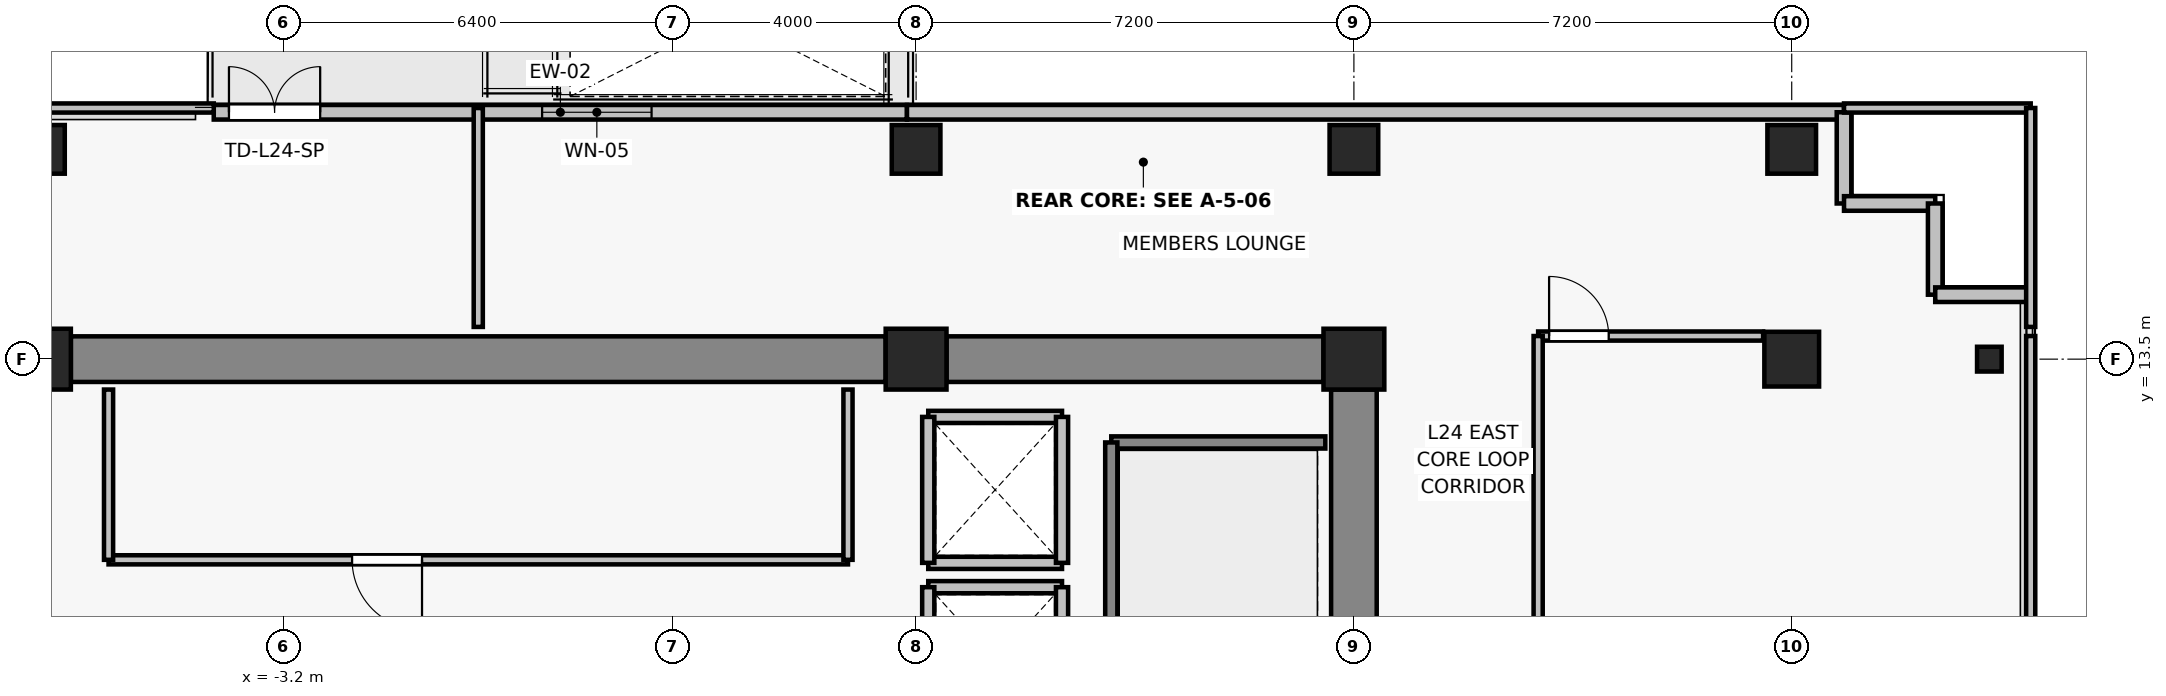
"""IFC4 building model, lengths in metres.
Left out: names, types, materials, properties, quantities, classifications, styles, units other than length and angle.
Written with IfcOpenShell. Run it as: python <this file> out.ifc"""

import sys

from ifc_helpers import new_model, si_unit, direction, frame, frame_2d, origin, origin_2d, place, context, subcontext, project, spatial, rectangle, i_section, extrude, source, transform, mapped, element, fill, save


model = new_model("IFC4")
c1 = context("Model", 3, precision=1e-05, world=origin(), true_north=direction((0.0, 1.0)))
c2 = subcontext(c1, "Body", "Model", "MODEL_VIEW")
j1 = project(units=[si_unit("LENGTHUNIT", "METRE"), si_unit("PLANEANGLEUNIT", "RADIAN")], contexts=[c1])
p1 = place(None, origin())
s1 = spatial("IfcSite", under=j1, at=p1, CompositionType="ELEMENT")
p2 = place(p1, origin())
s2 = spatial("IfcBuilding", under=s1, at=p2, CompositionType="ELEMENT")
p3 = place(p2, frame((0.0, 0.0, 90.1)))
s3 = spatial("IfcBuildingStorey", under=s2, at=p3, CompositionType="ELEMENT", Elevation=90.1)
for number, where, z_axis, x_axis in (
    (1, (-7.2, 13.5, 0.0), (0.0, 0.0, 1.0), (1.0, 0.0, 0.0)),
    (2, (7.2, 13.5, 0.0), (0.0, 0.0, 1.0), (1.0, 0.0, 0.0)),
    (3, (14.4, 13.5, 0.0), (0.0, 0.0, 1.0), (1.0, 0.0, 0.0)),
):
    element("IfcColumn", number, at=place(p3, frame(where, z_axis=z_axis, x_axis=x_axis)), inside=s3, PredefinedType="COLUMN", context=c2, shape_type="SweptSolid", body=[
        extrude(rectangle(XDim=1.0, YDim=1.0, at=origin_2d()), origin(), (0.0, 0.0, 1.0), 3.3),
    ])
p4 = place(p3, frame((21.6, 13.5, 0.0), z_axis=(0.0, 0.0, 1.0), x_axis=(1.0, 0.0, 0.0)))
e4 = element("IfcColumn", 4, at=p4, inside=s3, PredefinedType="COLUMN", context=c2, shape_type="SweptSolid", body=[
    extrude(rectangle(XDim=0.9, YDim=0.9, at=origin_2d()), origin(), (0.0, 0.0, 1.0), 3.3),
])
for number, where, z_axis, x_axis in (
    (5, (-7.2, 16.95, 0.0), (0.0, 0.0, 1.0), (1.0, 0.0, 0.0)),
    (6, (7.2, 16.95, 0.0), (0.0, 0.0, 1.0), (1.0, 0.0, 0.0)),
    (7, (14.4, 16.95, 0.0), (0.0, 0.0, 1.0), (1.0, 0.0, 0.0)),
    (8, (21.6, 16.95, 0.0), (0.0, 0.0, 1.0), (1.0, 0.0, 0.0)),
):
    element("IfcColumn", number, at=place(p3, frame(where, z_axis=z_axis, x_axis=x_axis)), inside=s3, PredefinedType="COLUMN", context=c2, shape_type="SweptSolid", body=[
        extrude(rectangle(XDim=0.8, YDim=0.8, at=origin_2d()), origin(), (0.0, 0.0, 1.0), 3.3),
    ])
p5 = place(p3, frame((24.85, 13.5, 0.0), z_axis=(0.0, 0.0, 1.0), x_axis=(1.0, 0.0, 0.0)))
e9 = element("IfcColumn", 9, at=p5, inside=s3, PredefinedType="COLUMN", context=c2, shape_type="SweptSolid", body=[
    extrude(i_section(OverallWidth=0.404, OverallDepth=0.407, WebThickness=0.022, FlangeThickness=0.032, FilletRadius=0.015, at=origin_2d()), origin(), (0.0, 0.0, 1.0), 3.3),
])
p6 = place(p3, frame((-6.7, 13.5, 0.0), z_axis=(0.0, 0.0, 1.0), x_axis=(1.0, 0.0, 0.0)))
e10 = element("IfcWall", 10, at=p6, inside=s3, PredefinedType="SHEAR", context=c2, shape_type="SweptSolid", body=[
    extrude(rectangle(XDim=13.4, YDim=0.75, at=frame_2d((6.7, 0.0))), origin(), (0.0, 0.0, 1.0), 3.075),
])
p7 = place(p3, frame((7.7, 13.5, 0.0), z_axis=(0.0, 0.0, 1.0), x_axis=(1.0, 0.0, 0.0)))
e11 = element("IfcWall", 11, at=p7, inside=s3, PredefinedType="SHEAR", context=c2, shape_type="SweptSolid", body=[
    extrude(rectangle(XDim=6.2, YDim=0.75, at=frame_2d((3.1, 0.0))), origin(), (0.0, 0.0, 1.0), 3.075),
])
p8 = place(p3, frame((14.4, 7.1, 0.0), z_axis=(0.0, 0.0, 1.0), x_axis=(0.0, 1.0, 0.0)))
e12 = element("IfcWall", 12, at=p8, inside=s3, PredefinedType="SHEAR", context=c2, shape_type="SweptSolid", body=[
    extrude(rectangle(XDim=5.9, YDim=0.75, at=frame_2d((2.95, 0.0))), origin(), (0.0, 0.0, 1.0), 3.075),
])
p9 = place(p3, frame((-4.35, 17.56, 0.0), z_axis=(0.0, 0.0, 1.0), x_axis=(1.0, 0.0, 0.0)))
e13 = element("IfcWall", 13, at=p9, inside=s3, PredefinedType="SOLIDWALL", context=c2, shape_type="SweptSolid", body=[
    extrude(rectangle(XDim=11.4, YDim=0.24, at=frame_2d((5.7, 0.0))), origin(), (0.0, 0.0, 1.0), 3.075),
])
p10 = place(p9, frame((0.25, 0.0, 0.0)))
e14 = element("IfcOpeningElement", 14, at=p10, cuts=e13, PredefinedType="OPENING", context=c2, shape_type="SweptSolid", body=[
    extrude(rectangle(XDim=1.5, YDim=2.2, at=frame_2d((0.75, 1.1))), frame((0.0, 0.13, 0.0), z_axis=(0.0, -1.0, 0.0), x_axis=(1.0, 0.0, 0.0)), (0.0, 0.0, 1.0), 0.26),
])
p11 = place(p9, frame((5.4, 0.0, 0.85)))
e15 = element("IfcOpeningElement", 15, at=p11, cuts=e13, PredefinedType="OPENING", context=c2, shape_type="SweptSolid", body=[
    extrude(rectangle(XDim=1.8, YDim=1.6, at=frame_2d((0.9, 0.8))), frame((0.0, 0.13, 0.0), z_axis=(0.0, -1.0, 0.0), x_axis=(1.0, 0.0, 0.0)), (0.0, 0.0, 1.0), 0.26),
])
p12 = place(p3, frame((22.46, 17.56, 0.0), z_axis=(0.0, 0.0, 1.0), x_axis=(-1.0, 0.0, 0.0)))
e16 = element("IfcWall", 16, at=p12, inside=s3, PredefinedType="SOLIDWALL", context=c2, shape_type="SweptSolid", body=[
    extrude(rectangle(XDim=15.41, YDim=0.24, at=frame_2d((7.705, 0.0))), origin(), (0.0, 0.0, 1.0), 3.075),
])
p13 = place(p3, frame((22.46, 16.06, 0.0), z_axis=(0.0, 0.0, 1.0), x_axis=(0.0, 1.0, 0.0)))
e17 = element("IfcWall", 17, at=p13, inside=s3, PredefinedType="SOLIDWALL", context=c2, shape_type="SweptSolid", body=[
    extrude(rectangle(XDim=1.5, YDim=0.24, at=frame_2d((0.75, 0.0))), origin(), (0.0, 0.0, 1.0), 2.565),
])
for number, where, z_axis, x_axis in (
    (18, (23.96, 16.06, 0.0), (0.0, 0.0, 1.0), (-1.0, 0.0, 0.0)),
    (19, (23.96, 14.56, 0.0), (0.0, 0.0, 1.0), (0.0, 1.0, 0.0)),
    (20, (25.46, 14.56, 0.0), (0.0, 0.0, 1.0), (-1.0, 0.0, 0.0)),
):
    element("IfcWall", number, at=place(p3, frame(where, z_axis=z_axis, x_axis=x_axis)), inside=s3, PredefinedType="SOLIDWALL", context=c2, shape_type="SweptSolid", body=[
        extrude(rectangle(XDim=1.5, YDim=0.24, at=frame_2d((0.75, 0.0))), origin(), (0.0, 0.0, 1.0), 3.075),
    ])
p14 = place(p3, frame((7.4, 9.75, 0.0), z_axis=(0.0, 0.0, 1.0), x_axis=(1.0, 0.0, 0.0)))
e21 = element("IfcWall", 21, at=p14, inside=s3, PredefinedType="SOLIDWALL", context=c2, shape_type="SweptSolid", body=[
    extrude(rectangle(XDim=2.2, YDim=0.2, at=frame_2d((1.1, 0.0))), origin(), (0.0, 0.0, 1.0), 2.515),
])
p15 = place(p3, frame((7.4, 7.35, 0.0), z_axis=(0.0, 0.0, 1.0), x_axis=(0.0, 1.0, 0.0)))
e22 = element("IfcWall", 22, at=p15, inside=s3, PredefinedType="SOLIDWALL", context=c2, shape_type="SweptSolid", body=[
    extrude(rectangle(XDim=2.4, YDim=0.2, at=frame_2d((1.2, 0.0))), origin(), (0.0, 0.0, 1.0), 2.515),
])
p16 = place(p3, frame((9.6, 9.75, 0.0), z_axis=(0.0, 0.0, 1.0), x_axis=(0.0, -1.0, 0.0)))
e23 = element("IfcWall", 23, at=p16, inside=s3, PredefinedType="SOLIDWALL", context=c2, shape_type="SweptSolid", body=[
    extrude(rectangle(XDim=2.4, YDim=0.2, at=frame_2d((1.2, 0.0))), origin(), (0.0, 0.0, 1.0), 3.075),
])
for number, where, z_axis, x_axis in (
    (24, (9.6, 10.15, 0.0), (0.0, 0.0, 1.0), (-1.0, 0.0, 0.0)),
    (25, (7.4, 12.55, 0.0), (0.0, 0.0, 1.0), (1.0, 0.0, 0.0)),
):
    element("IfcWall", number, at=place(p3, frame(where, z_axis=z_axis, x_axis=x_axis)), inside=s3, PredefinedType="SOLIDWALL", context=c2, shape_type="SweptSolid", body=[
        extrude(rectangle(XDim=2.2, YDim=0.2, at=frame_2d((1.1, 0.0))), origin(), (0.0, 0.0, 1.0), 2.515),
    ])
p17 = place(p3, frame((7.4, 10.15, 0.0), z_axis=(0.0, 0.0, 1.0), x_axis=(0.0, 1.0, 0.0)))
e26 = element("IfcWall", 26, at=p17, inside=s3, PredefinedType="SOLIDWALL", context=c2, shape_type="SweptSolid", body=[
    extrude(rectangle(XDim=2.4, YDim=0.2, at=frame_2d((1.2, 0.0))), origin(), (0.0, 0.0, 1.0), 2.515),
])
p18 = place(p3, frame((9.6, 12.55, 0.0), z_axis=(0.0, 0.0, 1.0), x_axis=(0.0, -1.0, 0.0)))
e27 = element("IfcWall", 27, at=p18, inside=s3, PredefinedType="SOLIDWALL", context=c2, shape_type="SweptSolid", body=[
    extrude(rectangle(XDim=2.4, YDim=0.2, at=frame_2d((1.2, 0.0))), origin(), (0.0, 0.0, 1.0), 3.075),
])
p19 = place(p3, frame((10.41, 12.13, 0.0), z_axis=(0.0, 0.0, 1.0), x_axis=(1.0, 0.0, 0.0)))
e28 = element("IfcWall", 28, at=p19, inside=s3, PredefinedType="SOLIDWALL", context=c2, shape_type="SweptSolid", body=[
    extrude(rectangle(XDim=3.52, YDim=0.2, at=frame_2d((1.76, 0.0))), origin(), (0.0, 0.0, 1.0), 3.075),
])
p20 = place(p3, frame((10.41, 3.29, 0.0), z_axis=(0.0, 0.0, 1.0), x_axis=(0.0, 1.0, 0.0)))
e29 = element("IfcWall", 29, at=p20, inside=s3, PredefinedType="SOLIDWALL", context=c2, shape_type="SweptSolid", body=[
    extrude(rectangle(XDim=8.84, YDim=0.2, at=frame_2d((4.42, 0.0))), origin(), (0.0, 0.0, 1.0), 3.075),
])
p21 = place(p3, frame((6.08, 10.2, 0.0), z_axis=(0.0, 0.0, 1.0), x_axis=(-1.0, 0.0, 0.0)))
e30 = element("IfcWall", 30, at=p21, inside=s3, PredefinedType="PARTITIONING", context=c2, shape_type="SweptSolid", body=[
    extrude(rectangle(XDim=12.16, YDim=0.15, at=frame_2d((6.08, 0.0))), origin(), (0.0, 0.0, 1.0), 3.075),
])
p22 = place(p21, frame((7.005, 0.0, 0.0)))
e31 = element("IfcOpeningElement", 31, at=p22, cuts=e30, PredefinedType="OPENING", context=c2, shape_type="SweptSolid", body=[
    extrude(rectangle(XDim=1.15, YDim=2.15, at=frame_2d((0.575, 1.075))), frame((0.0, 0.085, 0.0), z_axis=(0.0, -1.0, 0.0), x_axis=(1.0, 0.0, 0.0)), (0.0, 0.0, 1.0), 0.17),
])
for number, where, z_axis, x_axis in (
    (32, (-6.08, 10.2, 0.0), (0.0, 0.0, 1.0), (0.0, 1.0, 0.0)),
    (33, (6.08, 13.0, 0.0), (0.0, 0.0, 1.0), (0.0, -1.0, 0.0)),
):
    element("IfcWall", number, at=place(p3, frame(where, z_axis=z_axis, x_axis=x_axis)), inside=s3, PredefinedType="PARTITIONING", context=c2, shape_type="SweptSolid", body=[
        extrude(rectangle(XDim=2.8, YDim=0.15, at=frame_2d((1.4, 0.0))), origin(), (0.0, 0.0, 1.0), 3.075),
    ])
p23 = place(p3, frame((17.43, 13.88, 0.0), z_axis=(0.0, 0.0, 1.0), x_axis=(1.0, 0.0, 0.0)))
e34 = element("IfcWall", 34, at=p23, inside=s3, PredefinedType="PARTITIONING", context=c2, shape_type="SweptSolid", body=[
    extrude(rectangle(XDim=3.7, YDim=0.15, at=frame_2d((1.85, 0.0))), origin(), (0.0, 0.0, 1.0), 3.075),
])
p24 = place(p23, frame((0.18, 0.0, 0.0)))
e35 = element("IfcOpeningElement", 35, at=p24, cuts=e34, PredefinedType="OPENING", context=c2, shape_type="SweptSolid", body=[
    extrude(rectangle(XDim=0.98, YDim=2.15, at=frame_2d((0.49, 1.075))), frame((0.0, 0.085, 0.0), z_axis=(0.0, -1.0, 0.0), x_axis=(1.0, 0.0, 0.0)), (0.0, 0.0, 1.0), 0.17),
])
p25 = place(p3, frame((17.43, -1.77, 0.0), z_axis=(0.0, 0.0, 1.0), x_axis=(0.0, 1.0, 0.0)))
e36 = element("IfcWall", 36, at=p25, inside=s3, PredefinedType="PARTITIONING", context=c2, shape_type="SweptSolid", body=[
    extrude(rectangle(XDim=15.65, YDim=0.15, at=frame_2d((7.825, 0.0))), origin(), (0.0, 0.0, 1.0), 2.515),
])
p26 = place(p25, frame((7.335, 0.0, 0.0)))
e37 = element("IfcOpeningElement", 37, at=p26, cuts=e36, PredefinedType="OPENING", context=c2, shape_type="SweptSolid", body=[
    extrude(rectangle(XDim=0.98, YDim=2.15, at=frame_2d((0.49, 1.075))), frame((0.0, 0.085, 0.0), z_axis=(0.0, -1.0, 0.0), x_axis=(1.0, 0.0, 0.0)), (0.0, 0.0, 1.0), 0.17),
])
p27 = place(p3, frame((25.53, 13.88, 0.0), z_axis=(0.0, 0.0, 1.0), x_axis=(0.0, -1.0, 0.0)))
e38 = element("IfcWall", 38, at=p27, inside=s3, PredefinedType="PARTITIONING", context=c2, shape_type="SweptSolid", body=[
    extrude(rectangle(XDim=15.65, YDim=0.15, at=frame_2d((7.825, 0.0))), origin(), (0.0, 0.0, 1.0), 3.075),
])
p28 = place(p3, frame((-29.53, 17.63, 0.0), z_axis=(0.0, 0.0, 1.0), x_axis=(1.0, 0.0, 0.0)))
e39 = element("IfcWall", 39, at=p28, inside=s3, PredefinedType="PARTITIONING", context=c2, shape_type="SweptSolid", body=[
    extrude(rectangle(XDim=25.18, YDim=0.15, at=frame_2d((12.59, 0.0))), origin(), (0.0, 0.0, 1.0), 3.075),
])
p29 = place(p3, frame((0.0, 17.63, 0.0), z_axis=(0.0, 0.0, 1.0), x_axis=(0.0, -1.0, 0.0)))
e40 = element("IfcWall", 40, at=p29, inside=s3, PredefinedType="PARTITIONING", context=c2, shape_type="SweptSolid", body=[
    extrude(rectangle(XDim=3.6, YDim=0.15, at=frame_2d((1.8, 0.0))), origin(), (0.0, 0.0, 1.0), 2.565),
])
p30 = place(p3, frame((22.46, 17.63, 0.0), z_axis=(0.0, 0.0, 1.0), x_axis=(1.0, 0.0, 0.0)))
e41 = element("IfcWall", 41, at=p30, inside=s3, PredefinedType="PARTITIONING", context=c2, shape_type="SweptSolid", body=[
    extrude(rectangle(XDim=3.07, YDim=0.15, at=frame_2d((1.535, 0.0))), origin(), (0.0, 0.0, 1.0), 3.075),
])
p31 = place(p3, frame((25.53, 17.63, 0.0), z_axis=(0.0, 0.0, 1.0), x_axis=(0.0, -1.0, 0.0)))
e42 = element("IfcWall", 42, at=p31, inside=s3, PredefinedType="PARTITIONING", context=c2, shape_type="SweptSolid", body=[
    extrude(rectangle(XDim=3.6, YDim=0.15, at=frame_2d((1.8, 0.0))), origin(), (0.0, 0.0, 1.0), 3.075),
])
m1 = source(origin(), c2, "Body", "SweptSolid", [
    extrude(rectangle(XDim=1.5, YDim=2.2, at=frame_2d((0.75, 1.1))), frame((0.0, 0.025, 0.0), z_axis=(0.0, -1.0, 0.0), x_axis=(1.0, 0.0, 0.0)), (0.0, 0.0, 1.0), 0.05),
])
p32 = place(p10, origin())
e43 = element("IfcDoor", 43, at=p32, inside=s3, OperationType="DOUBLE_DOOR_SINGLE_SWING", PredefinedType="DOOR", context=c2, shape_type="MappedRepresentation", body=[
    mapped(m1, transform((0.0, 0.0, 0.0), x_axis=(1.0, 0.0, 0.0), y_axis=(0.0, 1.0, 0.0), z_axis=(0.0, 0.0, 1.0), scale=1.0)),
])
fill(e14, e43)
m2 = source(origin(), c2, "Body", "SweptSolid", [
    extrude(rectangle(XDim=1.8, YDim=1.6, at=frame_2d((0.9, 0.8))), frame((0.0, 0.03, 0.0), z_axis=(0.0, -1.0, 0.0), x_axis=(1.0, 0.0, 0.0)), (0.0, 0.0, 1.0), 0.06),
])
p33 = place(p11, origin())
e44 = element("IfcWindow", 44, at=p33, inside=s3, PartitioningType="SINGLE_PANEL", PredefinedType="WINDOW", context=c2, shape_type="MappedRepresentation", body=[
    mapped(m2, transform((0.0, 0.0, 0.0), x_axis=(1.0, 0.0, 0.0), y_axis=(0.0, 1.0, 0.0), z_axis=(0.0, 0.0, 1.0), scale=1.0)),
])
fill(e15, e44)
m3 = source(origin(), c2, "Body", "SweptSolid", [
    extrude(rectangle(XDim=1.15, YDim=2.15, at=frame_2d((0.575, 1.075))), frame((0.0, 0.025, 0.0), z_axis=(0.0, -1.0, 0.0), x_axis=(1.0, 0.0, 0.0)), (0.0, 0.0, 1.0), 0.05),
])
p34 = place(p22, origin())
e45 = element("IfcDoor", 45, at=p34, inside=s3, OperationType="SINGLE_SWING_LEFT", PredefinedType="DOOR", context=c2, shape_type="MappedRepresentation", body=[
    mapped(m3, transform((0.0, 0.0, 0.0), x_axis=(1.0, 0.0, 0.0), y_axis=(0.0, 1.0, 0.0), z_axis=(0.0, 0.0, 1.0), scale=1.0)),
])
fill(e31, e45)
m4 = source(origin(), c2, "Body", "SweptSolid", [
    extrude(rectangle(XDim=0.98, YDim=2.15, at=frame_2d((0.49, 1.075))), frame((0.0, 0.025, 0.0), z_axis=(0.0, -1.0, 0.0), x_axis=(1.0, 0.0, 0.0)), (0.0, 0.0, 1.0), 0.05),
])
p35 = place(p24, origin())
e46 = element("IfcDoor", 46, at=p35, inside=s3, OperationType="SINGLE_SWING_LEFT", PredefinedType="DOOR", context=c2, shape_type="MappedRepresentation", body=[
    mapped(m4, transform((0.0, 0.0, 0.0), x_axis=(1.0, 0.0, 0.0), y_axis=(0.0, 1.0, 0.0), z_axis=(0.0, 0.0, 1.0), scale=1.0)),
])
fill(e35, e46)
save(model, sys.argv[1])
